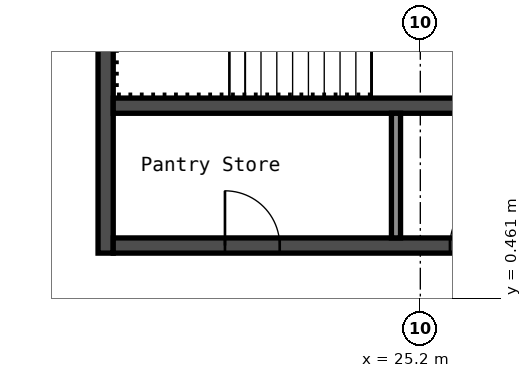
"""IFC4 building model, lengths in metres.
Left out: names, types, materials, properties, quantities, classifications, styles, units other than length and angle.
Written with IfcOpenShell. Run it as: python <this file> out.ifc"""

import sys

from ifc_helpers import new_model, si_unit, direction, frame, frame_2d, origin, place, context, subcontext, project, spatial, rectangle, extrude, element, fill, save


model = new_model("IFC4")
c1 = context("Model", 3, precision=1e-05, world=origin(), true_north=direction((0.0, 1.0)))
c2 = subcontext(c1, "Body", "Model", "MODEL_VIEW")
j1 = project(units=[si_unit("LENGTHUNIT", "METRE"), si_unit("PLANEANGLEUNIT", "RADIAN")], contexts=[c1])
p1 = place(None, origin())
s1 = spatial("IfcSite", under=j1, at=p1, CompositionType="ELEMENT")
p2 = place(p1, origin())
s2 = spatial("IfcBuilding", under=s1, at=p2, CompositionType="ELEMENT")
p3 = place(p2, frame((0.0, 0.0, 159.8)))
s3 = spatial("IfcBuildingStorey", under=s2, at=p3, CompositionType="ELEMENT", Elevation=159.8)
p4 = place(p3, frame((20.025, 1.2, 0.0), z_axis=(0.0, 0.0, 1.0), x_axis=(0.0, 1.0, 0.0)))
e1 = element("IfcWall", 1, at=p4, inside=s3, PredefinedType="SHEAR", context=c2, shape_type="SweptSolid", body=[
    extrude(rectangle(XDim=6.3, YDim=0.25, at=frame_2d((3.15, 0.0))), origin(), (0.0, 0.0, 1.0), 2.75),
])
p5 = place(p3, frame((20.15, 1.325, 0.0), z_axis=(0.0, 0.0, 1.0), x_axis=(1.0, 0.0, 0.0)))
e2 = element("IfcWall", 2, at=p5, inside=s3, PredefinedType="SHEAR", context=c2, shape_type="SweptSolid", body=[
    extrude(rectangle(XDim=7.5, YDim=0.25, at=frame_2d((3.75, 0.0))), origin(), (0.0, 0.0, 1.0), 2.75),
])
p6 = place(p5, frame((1.837, 0.0, 0.0)))
e3 = element("IfcOpeningElement", 3, at=p6, cuts=e2, PredefinedType="OPENING", context=c2, shape_type="SweptSolid", body=[
    extrude(rectangle(XDim=0.9, YDim=2.1, at=frame_2d((0.45, 1.05))), frame((0.0, 0.135, 0.0), z_axis=(0.0, -1.0, 0.0), x_axis=(1.0, 0.0, 0.0)), (0.0, 0.0, 1.0), 0.27),
])
p7 = place(p5, frame((5.538, 0.0, 0.0)))
e4 = element("IfcOpeningElement", 4, at=p7, cuts=e2, PredefinedType="OPENING", context=c2, shape_type="SweptSolid", body=[
    extrude(rectangle(XDim=0.9, YDim=2.1, at=frame_2d((0.45, 1.05))), frame((0.0, 0.135, 0.0), z_axis=(0.0, -1.0, 0.0), x_axis=(1.0, 0.0, 0.0)), (0.0, 0.0, 1.0), 0.27),
])
p8 = place(p3, frame((20.15, 3.625, 0.0), z_axis=(0.0, 0.0, 1.0), x_axis=(1.0, 0.0, 0.0)))
e5 = element("IfcWall", 5, at=p8, inside=s3, PredefinedType="SHEAR", context=c2, shape_type="SweptSolid", body=[
    extrude(rectangle(XDim=7.5, YDim=0.25, at=frame_2d((3.75, 0.0))), origin(), (0.0, 0.0, 1.0), 2.75),
])
p9 = place(p3, frame((24.8, 1.45, 0.0), z_axis=(0.0, 0.0, 1.0), x_axis=(0.0, 1.0, 0.0)))
e6 = element("IfcWall", 6, at=p9, inside=s3, PredefinedType="PARTITIONING", context=c2, shape_type="SweptSolid", body=[
    extrude(rectangle(XDim=2.05, YDim=0.15, at=frame_2d((1.025, 0.0))), origin(), (0.0, 0.0, 1.0), 2.75),
])
p10 = place(p6, origin())
e7 = element("IfcDoor", 7, at=p10, inside=s3, OperationType="SINGLE_SWING_RIGHT", PredefinedType="DOOR", context=c2, shape_type="SweptSolid", body=[
    extrude(rectangle(XDim=0.9, YDim=2.1, at=frame_2d((0.45, 1.05))), frame((0.0, 0.025, 0.0), z_axis=(0.0, -1.0, 0.0), x_axis=(1.0, 0.0, 0.0)), (0.0, 0.0, 1.0), 0.05),
])
fill(e3, e7)
p11 = place(p7, origin())
e8 = element("IfcDoor", 8, at=p11, inside=s3, OperationType="SINGLE_SWING_LEFT", PredefinedType="DOOR", context=c2, shape_type="SweptSolid", body=[
    extrude(rectangle(XDim=0.9, YDim=2.1, at=frame_2d((0.45, 1.05))), frame((0.0, 0.025, 0.0), z_axis=(0.0, -1.0, 0.0), x_axis=(1.0, 0.0, 0.0)), (0.0, 0.0, 1.0), 0.05),
])
fill(e4, e8)
save(model, sys.argv[1])
